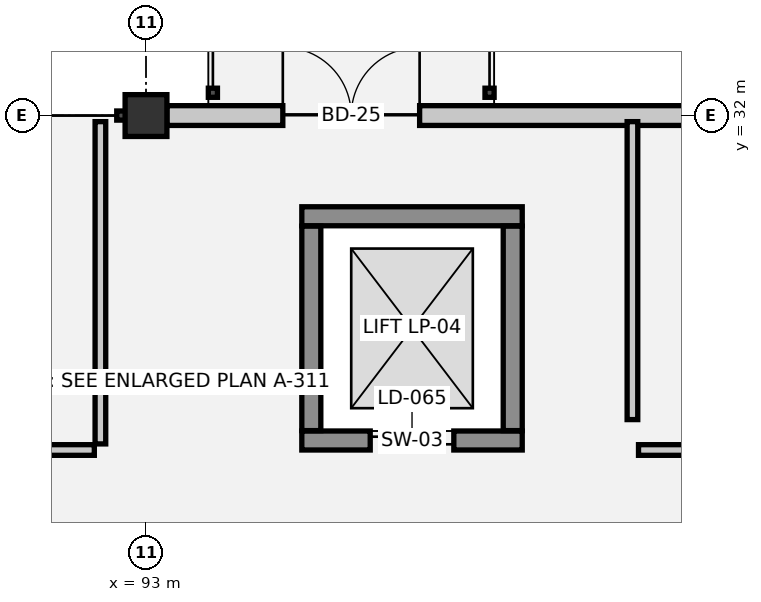
"""IFC4 building model, lengths in metres.
Left out: names, types, materials, properties, quantities, classifications, styles, units other than length and angle.
Written with IfcOpenShell. Run it as: python <this file> out.ifc"""

import sys

from ifc_helpers import new_model, si_unit, direction, frame, frame_2d, origin, origin_2d, place, context, subcontext, project, spatial, rectangle, extrude, element, fill, save


model = new_model("IFC4")
c1 = context("Model", 3, precision=1e-05, world=origin(), true_north=direction((0.0, 1.0)))
c2 = subcontext(c1, "Body", "Model", "MODEL_VIEW")
j1 = project(units=[si_unit("LENGTHUNIT", "METRE"), si_unit("PLANEANGLEUNIT", "RADIAN")], contexts=[c1])
p1 = place(None, origin())
s1 = spatial("IfcSite", under=j1, at=p1, CompositionType="ELEMENT")
p2 = place(p1, origin())
s2 = spatial("IfcBuilding", under=s1, at=p2, CompositionType="ELEMENT")
p3 = place(p2, frame((0.0, 0.0, 14.4)))
s3 = spatial("IfcBuildingStorey", under=s2, at=p3, CompositionType="ELEMENT", Elevation=14.4)
p4 = place(p3, frame((93.0, 32.0, 0.0), z_axis=(0.0, 0.0, 1.0), x_axis=(1.0, 0.0, 0.0)))
e1 = element("IfcColumn", 1, at=p4, inside=s3, PredefinedType="COLUMN", context=c2, shape_type="SweptSolid", body=[
    extrude(rectangle(XDim=0.55, YDim=0.55, at=origin_2d()), origin(), (0.0, 0.0, 1.0), 3.9),
])
p5 = place(p3, frame((93.275, 32.0, 0.0), z_axis=(0.0, 0.0, 1.0), x_axis=(1.0, 0.0, 0.0)))
e2 = element("IfcWall", 2, at=p5, inside=s3, PredefinedType="SOLIDWALL", context=c2, shape_type="SweptSolid", body=[
    extrude(rectangle(XDim=7.45, YDim=0.26, at=frame_2d((3.725, 0.0))), origin(), (0.0, 0.0, 1.0), 2.84),
])
p6 = place(p5, frame((1.525, 0.0, 0.0)))
e3 = element("IfcOpeningElement", 3, at=p6, cuts=e2, PredefinedType="OPENING", context=c2, shape_type="SweptSolid", body=[
    extrude(rectangle(XDim=1.8, YDim=2.25, at=frame_2d((0.9, 1.125))), frame((0.0, 0.14, 0.0), z_axis=(0.0, -1.0, 0.0), x_axis=(1.0, 0.0, 0.0)), (0.0, 0.0, 1.0), 0.28),
])
p7 = place(p3, frame((95.05, 27.725, 0.0), z_axis=(0.0, 0.0, 1.0), x_axis=(1.0, 0.0, 0.0)))
e4 = element("IfcWall", 4, at=p7, inside=s3, PredefinedType="SHEAR", context=c2, shape_type="SweptSolid", body=[
    extrude(rectangle(XDim=2.9, YDim=0.25, at=frame_2d((1.45, 0.0))), origin(), (0.0, 0.0, 1.0), 3.9),
])
p8 = place(p7, frame((0.9, 0.0, 0.0)))
e5 = element("IfcOpeningElement", 5, at=p8, cuts=e4, PredefinedType="OPENING", context=c2, shape_type="SweptSolid", body=[
    extrude(rectangle(XDim=1.1, YDim=2.15, at=frame_2d((0.55, 1.075))), frame((0.0, 0.135, 0.0), z_axis=(0.0, -1.0, 0.0), x_axis=(1.0, 0.0, 0.0)), (0.0, 0.0, 1.0), 0.27),
])
p9 = place(p3, frame((97.95, 30.675, 0.0), z_axis=(0.0, 0.0, 1.0), x_axis=(-1.0, 0.0, 0.0)))
e6 = element("IfcWall", 6, at=p9, inside=s3, PredefinedType="SHEAR", context=c2, shape_type="SweptSolid", body=[
    extrude(rectangle(XDim=2.9, YDim=0.25, at=frame_2d((1.45, 0.0))), origin(), (0.0, 0.0, 1.0), 3.9),
])
for number, where, z_axis, x_axis in (
    (7, (95.175, 30.545, 0.0), (0.0, 0.0, 1.0), (0.0, -1.0, 0.0)),
    (8, (97.825, 27.855, 0.0), (0.0, 0.0, 1.0), (0.0, 1.0, 0.0)),
):
    element("IfcWall", number, at=place(p3, frame(where, z_axis=z_axis, x_axis=x_axis)), inside=s3, PredefinedType="SHEAR", context=c2, shape_type="SweptSolid", body=[
        extrude(rectangle(XDim=2.69, YDim=0.25, at=frame_2d((1.345, 0.0))), origin(), (0.0, 0.0, 1.0), 3.9),
    ])
p10 = place(p3, frame((89.28, 27.6, 0.0), z_axis=(0.0, 0.0, 1.0), x_axis=(1.0, 0.0, 0.0)))
e9 = element("IfcWall", 9, at=p10, inside=s3, PredefinedType="PLUMBINGWALL", context=c2, shape_type="SweptSolid", body=[
    extrude(rectangle(XDim=3.04, YDim=0.14, at=frame_2d((1.52, 0.0))), origin(), (0.0, 0.0, 1.0), 3.54),
])
p11 = place(p10, frame((1.04, 0.0, 0.0)))
e10 = element("IfcOpeningElement", 10, at=p11, cuts=e9, PredefinedType="OPENING", context=c2, shape_type="SweptSolid", body=[
    extrude(rectangle(XDim=0.96, YDim=2.1, at=frame_2d((0.48, 1.05))), frame((0.0, 0.08, 0.0), z_axis=(0.0, -1.0, 0.0), x_axis=(1.0, 0.0, 0.0)), (0.0, 0.0, 1.0), 0.16),
])
p12 = place(p3, frame((99.48, 27.6, 0.0), z_axis=(0.0, 0.0, 1.0), x_axis=(1.0, 0.0, 0.0)))
e11 = element("IfcWall", 11, at=p12, inside=s3, PredefinedType="PLUMBINGWALL", context=c2, shape_type="SweptSolid", body=[
    extrude(rectangle(XDim=3.64, YDim=0.14, at=frame_2d((1.82, 0.0))), origin(), (0.0, 0.0, 1.0), 3.54),
])
p13 = place(p12, frame((1.36, 0.0, 0.0)))
e12 = element("IfcOpeningElement", 12, at=p13, cuts=e11, PredefinedType="OPENING", context=c2, shape_type="SweptSolid", body=[
    extrude(rectangle(XDim=0.92, YDim=2.1, at=frame_2d((0.46, 1.05))), frame((0.0, 0.08, 0.0), z_axis=(0.0, -1.0, 0.0), x_axis=(1.0, 0.0, 0.0)), (0.0, 0.0, 1.0), 0.16),
])
p14 = place(p3, frame((92.4, 27.68, 0.0), z_axis=(0.0, 0.0, 1.0), x_axis=(0.0, 1.0, 0.0)))
e13 = element("IfcWall", 13, at=p14, inside=s3, PredefinedType="PLUMBINGWALL", context=c2, shape_type="SweptSolid", body=[
    extrude(rectangle(XDim=4.24, YDim=0.14, at=frame_2d((2.12, 0.0))), origin(), (0.0, 0.0, 1.0), 3.54),
])
p15 = place(p3, frame((99.4, 28.0, 0.0), z_axis=(0.0, 0.0, 1.0), x_axis=(0.0, 1.0, 0.0)))
e14 = element("IfcWall", 14, at=p15, inside=s3, PredefinedType="PLUMBINGWALL", context=c2, shape_type="SweptSolid", body=[
    extrude(rectangle(XDim=3.92, YDim=0.14, at=frame_2d((1.96, 0.0))), origin(), (0.0, 0.0, 1.0), 3.54),
])
p16 = place(p6, origin())
e15 = element("IfcDoor", 15, at=p16, inside=s3, OperationType="DOUBLE_DOOR_SINGLE_SWING", PredefinedType="DOOR", context=c2, shape_type="SweptSolid", body=[
    extrude(rectangle(XDim=1.8, YDim=2.25, at=frame_2d((0.9, 1.125))), frame((0.0, 0.025, 0.0), z_axis=(0.0, -1.0, 0.0), x_axis=(1.0, 0.0, 0.0)), (0.0, 0.0, 1.0), 0.05),
])
fill(e3, e15)
p17 = place(p8, origin())
e16 = element("IfcDoor", 16, at=p17, inside=s3, OperationType="DOUBLE_DOOR_SLIDING", PredefinedType="DOOR", context=c2, shape_type="SweptSolid", body=[
    extrude(rectangle(XDim=1.1, YDim=2.15, at=frame_2d((0.55, 1.075))), frame((0.0, 0.025, 0.0), z_axis=(0.0, -1.0, 0.0), x_axis=(1.0, 0.0, 0.0)), (0.0, 0.0, 1.0), 0.05),
])
fill(e5, e16)
save(model, sys.argv[1])
